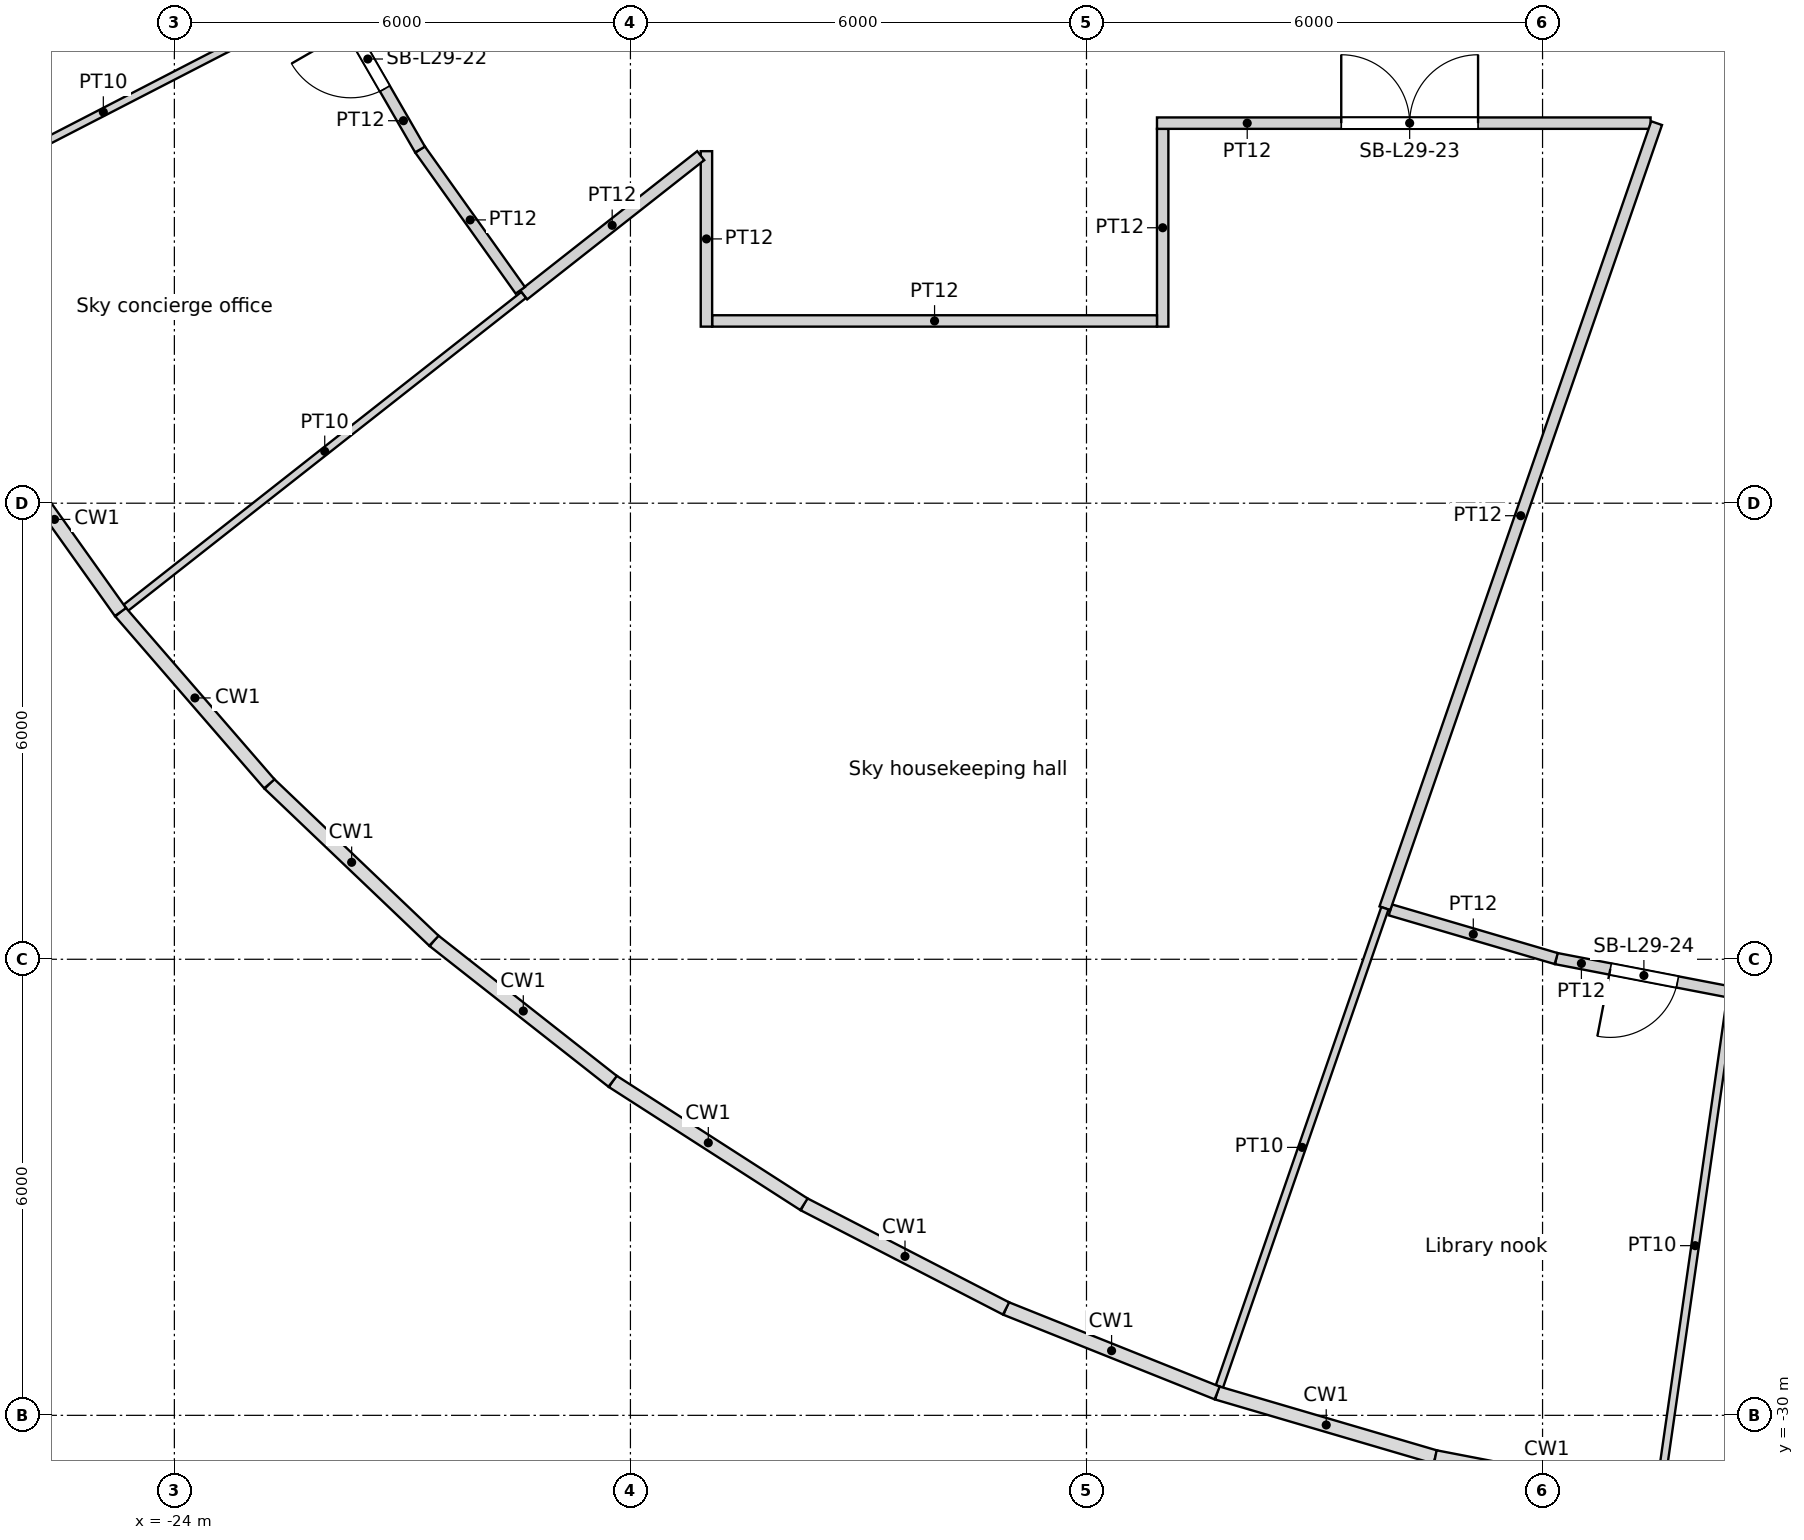
"""IFC4 building model, lengths in metres.
Left out: names, types, materials, properties, quantities, classifications, styles, units other than length and angle.
Written with IfcOpenShell. Run it as: python <this file> out.ifc"""

import sys

from ifc_helpers import new_model, si_unit, direction, frame, frame_2d, origin, origin_2d, place, context, subcontext, project, spatial, rectangle, circle, extrude, element, fill, save


model = new_model("IFC4")
c1 = context("Model", 3, precision=1e-05, world=origin(), true_north=direction((0.0, 1.0)))
c2 = subcontext(c1, "Body", "Model", "MODEL_VIEW")
j1 = project(units=[si_unit("LENGTHUNIT", "METRE"), si_unit("PLANEANGLEUNIT", "RADIAN")], contexts=[c1])
p1 = place(None, origin())
s1 = spatial("IfcSite", under=j1, at=p1, CompositionType="ELEMENT")
p2 = place(p1, origin())
s2 = spatial("IfcBuilding", under=s1, at=p2, CompositionType="ELEMENT")
p3 = place(p2, frame((0.0, 0.0, 114.6)))
s3 = spatial("IfcBuildingStorey", under=s2, at=p3, CompositionType="ELEMENT", Elevation=114.6)
for number, where, z_axis, x_axis in (
    (1, (-23.797, -18.715, 0.0), (0.0, 0.0, 1.0), (1.0, 0.0, 0.0)),
    (2, (-19.826, -22.88, 0.0), (0.0, 0.0, 1.0), (1.0, 0.0, 0.0)),
    (3, (-15.137, -26.219, 0.0), (0.0, 0.0, 1.0), (1.0, 0.0, 0.0)),
    (4, (-9.902, -28.61, 0.0), (0.0, 0.0, 1.0), (1.0, 0.0, 0.0)),
    (5, (-4.309, -29.966, 0.0), (0.0, 0.0, 1.0), (1.0, 0.0, 0.0)),
):
    element("IfcColumn", number, at=place(p3, frame(where, z_axis=z_axis, x_axis=x_axis)), inside=s3, PredefinedType="COLUMN", context=c2, shape_type="SweptSolid", body=[
        extrude(circle(Radius=0.6, at=origin_2d()), origin(), (0.0, 0.0, 1.0), 5.4),
    ])
for number, where, z_axis, x_axis in (
    (6, (-20.509, -13.489, 0.0), (0.0, 0.0, 1.0), (1.0, 0.0, 0.0)),
    (7, (-16.846, -17.855, 0.0), (0.0, 0.0, 1.0), (1.0, 0.0, 0.0)),
    (8, (-12.274, -21.259, 0.0), (0.0, 0.0, 1.0), (1.0, 0.0, 0.0)),
    (9, (-7.04, -23.516, 0.0), (0.0, 0.0, 1.0), (1.0, 0.0, 0.0)),
):
    element("IfcColumn", number, at=place(p3, frame(where, z_axis=z_axis, x_axis=x_axis)), inside=s3, PredefinedType="COLUMN", context=c2, shape_type="SweptSolid", body=[
        extrude(circle(Radius=0.65, at=origin_2d()), origin(), (0.0, 0.0, 1.0), 5.4),
    ])
for number, where, z_axis, x_axis in (
    (10, (-13.798, -12.802, 0.0), (0.0, 0.0, 1.0), (1.0, 0.0, 0.0)),
    (11, (-9.411, -16.301, 0.0), (0.0, 0.0, 1.0), (1.0, 0.0, 0.0)),
    (12, (-4.188, -18.35, 0.0), (0.0, 0.0, 1.0), (1.0, 0.0, 0.0)),
):
    element("IfcColumn", number, at=place(p3, frame(where, z_axis=z_axis, x_axis=x_axis)), inside=s3, PredefinedType="COLUMN", context=c2, shape_type="SweptSolid", body=[
        extrude(circle(Radius=0.7, at=origin_2d()), origin(), (0.0, 0.0, 1.0), 5.4),
    ])
p4 = place(p3, frame((-27.86, -14.363, 0.0), z_axis=(0.0, 0.0, 1.0), x_axis=(0.88884777779, 0.458202605751, 0.0)))
e13 = element("IfcWall", 13, at=p4, inside=s3, PredefinedType="PARTITIONING", context=c2, shape_type="SweptSolid", body=[
    extrude(rectangle(XDim=6.583, YDim=0.1, at=frame_2d((3.291, 0.0))), origin(), (0.0, 0.0, 1.0), 4.0),
])
p5 = place(p3, frame((-24.638, -19.376, 0.0), z_axis=(0.0, 0.0, 1.0), x_axis=(0.786065039075, 0.618143797464, 0.0)))
e14 = element("IfcWall", 14, at=p5, inside=s3, PredefinedType="PARTITIONING", context=c2, shape_type="SweptSolid", body=[
    extrude(rectangle(XDim=6.657, YDim=0.1, at=frame_2d((3.329, 0.0))), origin(), (0.0, 0.0, 1.0), 4.0),
])
p6 = place(p3, frame((-20.768, -13.347, 0.0), z_axis=(0.0, 0.0, 1.0), x_axis=(-0.500073279432, 0.865983091751, 0.0)))
e15 = element("IfcWall", 15, at=p6, inside=s3, PredefinedType="PARTITIONING", context=c2, shape_type="SweptSolid", body=[
    extrude(rectangle(XDim=2.349, YDim=0.15, at=frame_2d((1.175, 0.0))), origin(), (0.0, 0.0, 1.0), 4.0),
])
p7 = place(p6, frame((0.925, 0.0, 0.0)))
e16 = element("IfcOpeningElement", 16, at=p7, cuts=e15, PredefinedType="OPENING", context=c2, shape_type="SweptSolid", body=[
    extrude(rectangle(XDim=0.9, YDim=2.1, at=frame_2d((0.45, 1.05))), frame((0.0, 0.075, 0.0), z_axis=(0.0, -1.0, 0.0), x_axis=(1.0, 0.0, 0.0)), (0.0, 0.0, 1.0), 0.15),
])
p8 = place(p3, frame((-20.768, -13.347, 0.0), z_axis=(0.0, 0.0, 1.0), x_axis=(0.580029104411, -0.8145957513, 0.0)))
e17 = element("IfcWall", 17, at=p8, inside=s3, PredefinedType="PARTITIONING", context=c2, shape_type="SweptSolid", body=[
    extrude(rectangle(XDim=2.274, YDim=0.15, at=frame_2d((1.137, 0.0))), origin(), (0.0, 0.0, 1.0), 4.0),
])
p9 = place(p3, frame((-19.405, -15.26, 0.0), z_axis=(0.0, 0.0, 1.0), x_axis=(0.78606393764, 0.618145198106, 0.0)))
e18 = element("IfcWall", 18, at=p9, inside=s3, PredefinedType="PARTITIONING", context=c2, shape_type="SweptSolid", body=[
    extrude(rectangle(XDim=2.965, YDim=0.15, at=frame_2d((1.482, 0.0))), origin(), (0.0, 0.0, 1.0), 4.0),
])
p10 = place(p3, frame((-16.925, -15.602, 0.0), z_axis=(0.0, 0.0, 1.0), x_axis=(1.0, 0.0, 0.0)))
e19 = element("IfcWall", 19, at=p10, inside=s3, PredefinedType="PARTITIONING", context=c2, shape_type="SweptSolid", body=[
    extrude(rectangle(XDim=5.853, YDim=0.15, at=frame_2d((2.926, 0.0))), origin(), (0.0, 0.0, 1.0), 4.0),
])
p11 = place(p3, frame((-17.0, -13.369, 0.0), z_axis=(0.0, 0.0, 1.0), x_axis=(0.0, -1.0, 0.0)))
e20 = element("IfcWall", 20, at=p11, inside=s3, PredefinedType="PARTITIONING", context=c2, shape_type="SweptSolid", body=[
    extrude(rectangle(XDim=2.308, YDim=0.15, at=frame_2d((1.154, 0.0))), origin(), (0.0, 0.0, 1.0), 4.0),
])
p12 = place(p3, frame((-10.998, -15.677, 0.0), z_axis=(0.0, 0.0, 1.0), x_axis=(0.0, 1.0, 0.0)))
e21 = element("IfcWall", 21, at=p12, inside=s3, PredefinedType="PARTITIONING", context=c2, shape_type="SweptSolid", body=[
    extrude(rectangle(XDim=2.602, YDim=0.15, at=frame_2d((1.301, 0.0))), origin(), (0.0, 0.0, 1.0), 4.0),
])
p13 = place(p3, frame((-4.579, -13.0, 0.0), z_axis=(0.0, 0.0, 1.0), x_axis=(-1.0, 0.0, 0.0)))
e22 = element("IfcWall", 22, at=p13, inside=s3, PredefinedType="PARTITIONING", context=c2, shape_type="SweptSolid", body=[
    extrude(rectangle(XDim=6.494, YDim=0.15, at=frame_2d((3.247, 0.0))), origin(), (0.0, 0.0, 1.0), 4.0),
])
p14 = place(p13, frame((2.27, 0.0, 0.0)))
e23 = element("IfcOpeningElement", 23, at=p14, cuts=e22, PredefinedType="OPENING", context=c2, shape_type="SweptSolid", body=[
    extrude(rectangle(XDim=1.8, YDim=2.4, at=frame_2d((0.9, 1.2))), frame((0.0, 0.075, 0.0), z_axis=(0.0, -1.0, 0.0), x_axis=(1.0, 0.0, 0.0)), (0.0, 0.0, 1.0), 0.15),
])
p15 = place(p3, frame((-10.252, -29.621, 0.0), z_axis=(0.0, 0.0, 1.0), x_axis=(0.327065221768, 0.94500176757, 0.0)))
e24 = element("IfcWall", 24, at=p15, inside=s3, PredefinedType="PARTITIONING", context=c2, shape_type="SweptSolid", body=[
    extrude(rectangle(XDim=6.658, YDim=0.1, at=frame_2d((3.329, 0.0))), origin(), (0.0, 0.0, 1.0), 4.0),
])
p16 = place(p3, frame((-8.002, -23.35, 0.0), z_axis=(0.0, 0.0, 1.0), x_axis=(0.959505555221, -0.281689704285, 0.0)))
e25 = element("IfcWall", 25, at=p16, inside=s3, PredefinedType="PARTITIONING", context=c2, shape_type="SweptSolid", body=[
    extrude(rectangle(XDim=2.274, YDim=0.15, at=frame_2d((1.137, 0.0))), origin(), (0.0, 0.0, 1.0), 4.0),
])
p17 = place(p3, frame((-8.074, -23.329, 0.0), z_axis=(0.0, 0.0, 1.0), x_axis=(0.327069136832, 0.945000412557, 0.0)))
e26 = element("IfcWall", 26, at=p17, inside=s3, PredefinedType="PARTITIONING", context=c2, shape_type="SweptSolid", body=[
    extrude(rectangle(XDim=10.93, YDim=0.15, at=frame_2d((5.465, 0.0))), origin(), (0.0, 0.0, 1.0), 4.0),
])
p18 = place(p3, frame((-3.513, -24.436, 0.0), z_axis=(0.0, 0.0, 1.0), x_axis=(-0.981931506564, 0.189236667738, 0.0)))
e27 = element("IfcWall", 27, at=p18, inside=s3, PredefinedType="PARTITIONING", context=c2, shape_type="SweptSolid", body=[
    extrude(rectangle(XDim=2.349, YDim=0.15, at=frame_2d((1.175, 0.0))), origin(), (0.0, 0.0, 1.0), 4.0),
])
p19 = place(p18, frame((0.725, 0.0, 0.0)))
e28 = element("IfcOpeningElement", 28, at=p19, cuts=e27, PredefinedType="OPENING", context=c2, shape_type="SweptSolid", body=[
    extrude(rectangle(XDim=0.9, YDim=2.1, at=frame_2d((0.45, 1.05))), frame((0.0, 0.075, 0.0), z_axis=(0.0, -1.0, 0.0), x_axis=(1.0, 0.0, 0.0)), (0.0, 0.0, 1.0), 0.15),
])
p20 = place(p3, frame((-4.461, -31.025, 0.0), z_axis=(0.0, 0.0, 1.0), x_axis=(0.142314426487, 0.989821501087, 0.0)))
e29 = element("IfcWall", 29, at=p20, inside=s3, PredefinedType="PARTITIONING", context=c2, shape_type="SweptSolid", body=[
    extrude(rectangle(XDim=6.582, YDim=0.1, at=frame_2d((3.291, 0.0))), origin(), (0.0, 0.0, 1.0), 4.0),
])
p21 = place(p7, origin())
e30 = element("IfcDoor", 30, at=p21, inside=s3, OperationType="SINGLE_SWING_RIGHT", PredefinedType="DOOR", context=c2, shape_type="SweptSolid", body=[
    extrude(rectangle(XDim=0.9, YDim=2.1, at=frame_2d((0.45, 1.05))), frame((0.0, 0.025, 0.0), z_axis=(0.0, -1.0, 0.0), x_axis=(1.0, 0.0, 0.0)), (0.0, 0.0, 1.0), 0.05),
])
fill(e16, e30)
p22 = place(p14, origin())
e31 = element("IfcDoor", 31, at=p22, inside=s3, OperationType="DOUBLE_DOOR_SINGLE_SWING", PredefinedType="DOOR", context=c2, shape_type="SweptSolid", body=[
    extrude(rectangle(XDim=1.8, YDim=2.4, at=frame_2d((0.9, 1.2))), frame((0.0, 0.025, 0.0), z_axis=(0.0, -1.0, 0.0), x_axis=(1.0, 0.0, 0.0)), (0.0, 0.0, 1.0), 0.05),
])
fill(e23, e31)
p23 = place(p19, origin())
e32 = element("IfcDoor", 32, at=p23, inside=s3, OperationType="SINGLE_SWING_RIGHT", PredefinedType="DOOR", context=c2, shape_type="SweptSolid", body=[
    extrude(rectangle(XDim=0.9, YDim=2.1, at=frame_2d((0.45, 1.05))), frame((0.0, 0.025, 0.0), z_axis=(0.0, -1.0, 0.0), x_axis=(1.0, 0.0, 0.0)), (0.0, 0.0, 1.0), 0.05),
])
fill(e28, e32)
save(model, sys.argv[1])
